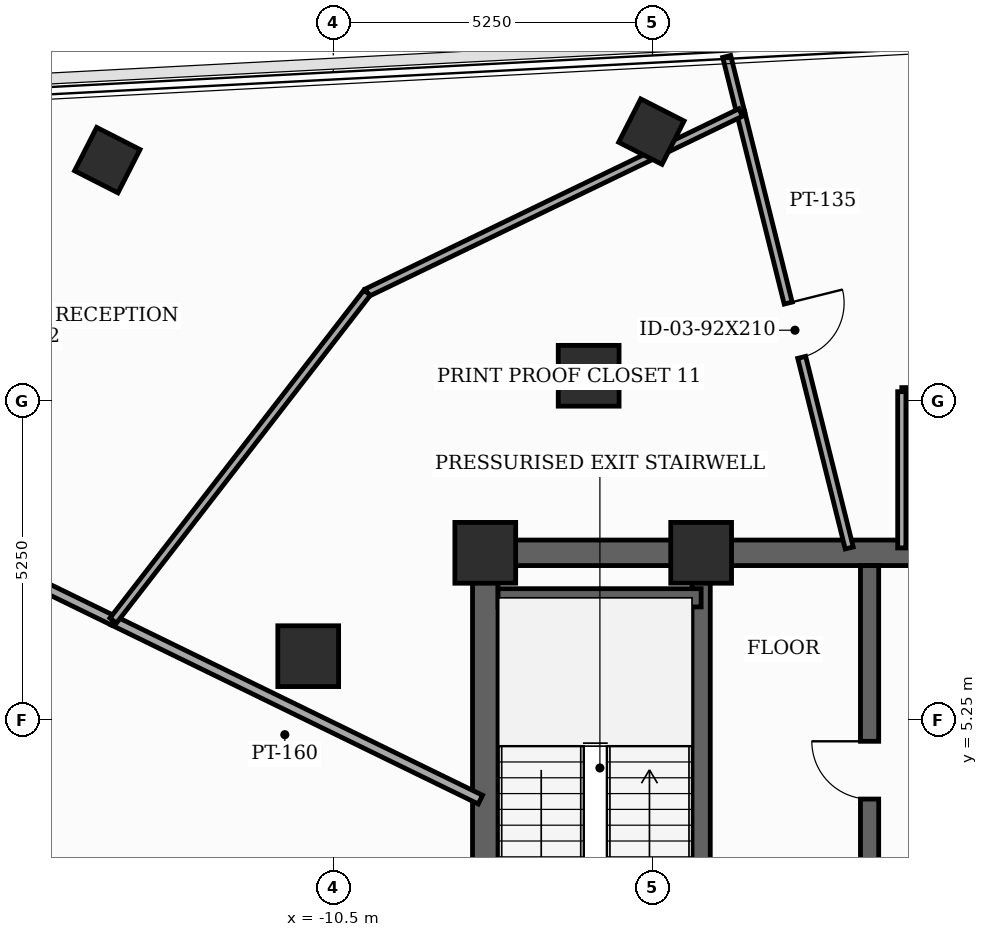
"""IFC4 building model, lengths in metres.
Left out: names, types, materials, properties, quantities, classifications, styles, units other than length and angle.
Written with IfcOpenShell. Run it as: python <this file> out.ifc"""

import sys

from ifc_helpers import new_model, si_unit, direction, frame, frame_2d, origin, origin_2d, place, context, subcontext, project, spatial, rectangle, extrude, element, fill, save


model = new_model("IFC4")
c1 = context("Model", 3, precision=1e-05, world=origin(), true_north=direction((0.0, 1.0)))
c2 = subcontext(c1, "Body", "Model", "MODEL_VIEW")
j1 = project(units=[si_unit("LENGTHUNIT", "METRE"), si_unit("PLANEANGLEUNIT", "RADIAN")], contexts=[c1])
p1 = place(None, origin())
s1 = spatial("IfcSite", under=j1, at=p1, CompositionType="ELEMENT")
p2 = place(p1, origin())
s2 = spatial("IfcBuilding", under=s1, at=p2, CompositionType="ELEMENT")
p3 = place(p2, frame((0.0, 0.0, 248.5)))
s3 = spatial("IfcBuildingStorey", under=s2, at=p3, CompositionType="ELEMENT", Elevation=248.5)
for number, where, z_axis, x_axis in (
    (1, (-4.45, 8.0, 0.0), (0.0, 0.0, 1.0), (1.0, 0.0, 0.0)),
    (2, (-8.0, 8.0, 0.0), (0.0, 0.0, 1.0), (1.0, 0.0, 0.0)),
    (3, (-6.3, 10.912, 0.0), (0.0, 0.0, 1.0), (1.0, 0.0, 0.0)),
    (4, (-10.912, 6.3, 0.0), (0.0, 0.0, 1.0), (1.0, 0.0, 0.0)),
):
    element("IfcColumn", number, at=place(p3, frame(where, z_axis=z_axis, x_axis=x_axis)), inside=s3, PredefinedType="COLUMN", context=c2, shape_type="SweptSolid", body=[
        extrude(rectangle(XDim=1.0, YDim=1.0, at=origin_2d()), origin(), (0.0, 0.0, 1.0), 3.7),
    ])
for number, where, z_axis, x_axis in (
    (5, (-5.269, 14.927, 0.0), (0.0, 0.0, 1.0), (0.454, 0.891, 0.0)),
    (6, (-14.216, 14.458, 0.0), (0.0, 0.0, 1.0), (0.454, 0.891, 0.0)),
):
    element("IfcColumn", number, at=place(p3, frame(where, z_axis=z_axis, x_axis=x_axis)), inside=s3, PredefinedType="COLUMN", context=c2, shape_type="SweptSolid", body=[
        extrude(rectangle(XDim=0.8, YDim=0.8, at=origin_2d()), origin(), (0.0, 0.0, 1.0), 3.7),
    ])
p4 = place(p3, frame((-8.0, -8.0, 0.0), z_axis=(0.0, 0.0, 1.0), x_axis=(0.0, 1.0, 0.0)))
e7 = element("IfcWall", 7, at=p4, inside=s3, PredefinedType="SHEAR", context=c2, shape_type="SweptSolid", body=[
    extrude(rectangle(XDim=16.0, YDim=0.42, at=frame_2d((8.0, 0.0))), origin(), (0.0, 0.0, 1.0), 3.5),
])
p5 = place(p4, frame((0.681, 0.0, 0.0)))
e8 = element("IfcOpeningElement", 8, at=p5, cuts=e7, PredefinedType="OPENING", context=c2, shape_type="SweptSolid", body=[
    extrude(rectangle(XDim=0.85, YDim=2.02, at=frame_2d((0.425, 1.01))), frame((0.0, 0.22, 0.0), z_axis=(0.0, -1.0, 0.0), x_axis=(1.0, 0.0, 0.0)), (0.0, 0.0, 1.0), 0.44),
])
p6 = place(p4, frame((5.35, 0.0, 0.0)))
e9 = element("IfcOpeningElement", 9, at=p6, cuts=e7, PredefinedType="OPENING", context=c2, shape_type="SweptSolid", body=[
    extrude(rectangle(XDim=1.05, YDim=2.15, at=frame_2d((0.525, 1.075))), frame((0.0, 0.22, 0.0), z_axis=(0.0, -1.0, 0.0), x_axis=(1.0, 0.0, 0.0)), (0.0, 0.0, 1.0), 0.44),
])
p7 = place(p3, frame((-8.0, 8.0, 0.0), z_axis=(0.0, 0.0, 1.0), x_axis=(1.0, 0.0, 0.0)))
e10 = element("IfcWall", 10, at=p7, inside=s3, PredefinedType="SHEAR", context=c2, shape_type="SweptSolid", body=[
    extrude(rectangle(XDim=16.0, YDim=0.42, at=frame_2d((8.0, 0.0))), origin(), (0.0, 0.0, 1.0), 3.5),
])
p8 = place(p7, frame((7.1, 0.0, 0.0)))
e11 = element("IfcOpeningElement", 11, at=p8, cuts=e10, PredefinedType="OPENING", context=c2, shape_type="SweptSolid", body=[
    extrude(rectangle(XDim=1.8, YDim=2.15, at=frame_2d((0.9, 1.075))), frame((0.0, 0.22, 0.0), z_axis=(0.0, -1.0, 0.0), x_axis=(1.0, 0.0, 0.0)), (0.0, 0.0, 1.0), 0.44),
])
p9 = place(p3, frame((-4.45, -7.79, 0.0), z_axis=(0.0, 0.0, 1.0), x_axis=(0.0, 1.0, 0.0)))
e12 = element("IfcWall", 12, at=p9, inside=s3, PredefinedType="SHEAR", context=c2, shape_type="SweptSolid", body=[
    extrude(rectangle(XDim=15.58, YDim=0.3, at=frame_2d((7.79, 0.0))), origin(), (0.0, 0.0, 1.0), 3.5),
])
p10 = place(p3, frame((-7.79, 7.26, 0.0), z_axis=(0.0, 0.0, 1.0), x_axis=(1.0, 0.0, 0.0)))
e13 = element("IfcWall", 13, at=p10, inside=s3, PredefinedType="SHEAR", context=c2, shape_type="SweptSolid", body=[
    extrude(rectangle(XDim=3.34, YDim=0.3, at=frame_2d((1.67, 0.0))), origin(), (0.0, 0.0, 1.0), 3.5),
])
p11 = place(p3, frame((-1.68, -4.85, 0.0), z_axis=(0.0, 0.0, 1.0), x_axis=(0.0, 1.0, 0.0)))
e14 = element("IfcWall", 14, at=p11, inside=s3, PredefinedType="SHEAR", context=c2, shape_type="SweptSolid", body=[
    extrude(rectangle(XDim=12.64, YDim=0.3, at=frame_2d((6.32, 0.0))), origin(), (0.0, 0.0, 1.0), 3.5),
])
p12 = place(p11, frame((2.6, 0.0, 0.0)))
e15 = element("IfcOpeningElement", 15, at=p12, cuts=e14, PredefinedType="OPENING", context=c2, shape_type="SweptSolid", body=[
    extrude(rectangle(XDim=0.95, YDim=2.1, at=frame_2d((0.475, 1.05))), frame((0.0, 0.16, 0.0), z_axis=(0.0, -1.0, 0.0), x_axis=(1.0, 0.0, 0.0)), (0.0, 0.0, 1.0), 0.32),
])
p13 = place(p11, frame((8.8, 0.0, 0.0)))
e16 = element("IfcOpeningElement", 16, at=p13, cuts=e14, PredefinedType="OPENING", context=c2, shape_type="SweptSolid", body=[
    extrude(rectangle(XDim=0.95, YDim=2.1, at=frame_2d((0.475, 1.05))), frame((0.0, 0.16, 0.0), z_axis=(0.0, -1.0, 0.0), x_axis=(1.0, 0.0, 0.0)), (0.0, 0.0, 1.0), 0.32),
])
p14 = place(p3, frame((4.742, 10.65, 0.0), z_axis=(0.0, 0.0, 1.0), x_axis=(-1.0, 0.0, 0.0)))
e17 = element("IfcWall", 17, at=p14, inside=s3, PredefinedType="PARTITIONING", context=c2, shape_type="SweptSolid", body=[
    extrude(rectangle(XDim=5.892, YDim=0.135, at=frame_2d((2.946, 0.0))), origin(), (0.0, 0.0, 1.0), 2.885),
])
p15 = place(p14, frame((2.471, 0.0, 0.0)))
e18 = element("IfcOpeningElement", 18, at=p15, cuts=e17, PredefinedType="OPENING", context=c2, shape_type="SweptSolid", body=[
    extrude(rectangle(XDim=0.95, YDim=2.1, at=frame_2d((0.475, 1.05))), frame((0.0, 0.077, 0.0), z_axis=(0.0, -1.0, 0.0), x_axis=(1.0, 0.0, 0.0)), (0.0, 0.0, 1.0), 0.155),
])
p16 = place(p3, frame((-1.15, 10.65, 0.0), z_axis=(0.0, 0.0, 1.0), x_axis=(0.0, -1.0, 0.0)))
e19 = element("IfcWall", 19, at=p16, inside=s3, PredefinedType="PARTITIONING", context=c2, shape_type="SweptSolid", body=[
    extrude(rectangle(XDim=2.57, YDim=0.135, at=frame_2d((1.285, 0.0))), origin(), (0.0, 0.0, 1.0), 2.885),
])
p17 = place(p3, frame((-8.08, 3.941, 0.0), z_axis=(0.0, 0.0, 1.0), x_axis=(-0.898794985177, 0.438369221798, 0.0)))
e20 = element("IfcWall", 20, at=p17, inside=s3, PredefinedType="PARTITIONING", context=c2, shape_type="SweptSolid", body=[
    extrude(rectangle(XDim=6.719, YDim=0.16, at=frame_2d((3.359, 0.0))), origin(), (0.0, 0.0, 1.0), 2.885),
])
p18 = place(p3, frame((-14.119, 6.886, 0.0), z_axis=(0.0, 0.0, 1.0), x_axis=(-0.898768620199, 0.438423274184, 0.0)))
e21 = element("IfcWall", 21, at=p18, inside=s3, PredefinedType="PARTITIONING", context=c2, shape_type="SweptSolid", body=[
    extrude(rectangle(XDim=13.442, YDim=0.16, at=frame_2d((6.721, 0.0))), origin(), (0.0, 0.0, 1.0), 3.035),
])
p19 = place(p18, frame((6.261, 0.0, 0.0)))
e22 = element("IfcOpeningElement", 22, at=p19, cuts=e21, PredefinedType="OPENING", context=c2, shape_type="SweptSolid", body=[
    extrude(rectangle(XDim=0.92, YDim=2.1, at=frame_2d((0.46, 1.05))), frame((0.0, 0.09, 0.0), z_axis=(0.0, -1.0, 0.0), x_axis=(1.0, 0.0, 0.0)), (0.0, 0.0, 1.0), 0.18),
])
p20 = place(p3, frame((-3.8, 15.242, 0.0), z_axis=(0.0, 0.0, 1.0), x_axis=(0.241889603588, -0.970303777008, 0.0)))
e23 = element("IfcWall", 23, at=p20, inside=s3, PredefinedType="PARTITIONING", context=c2, shape_type="SweptSolid", body=[
    extrude(rectangle(XDim=7.381, YDim=0.135, at=frame_2d((3.69, 0.0))), origin(), (0.0, 0.0, 1.0), 2.885),
])
p21 = place(p20, frame((3.231, 0.0, 0.0)))
e24 = element("IfcOpeningElement", 24, at=p21, cuts=e23, PredefinedType="OPENING", context=c2, shape_type="SweptSolid", body=[
    extrude(rectangle(XDim=0.92, YDim=2.1, at=frame_2d((0.46, 1.05))), frame((0.0, 0.077, 0.0), z_axis=(0.0, -1.0, 0.0), x_axis=(1.0, 0.0, 0.0)), (0.0, 0.0, 1.0), 0.155),
])
p22 = place(p3, frame((-4.03, 16.164, 0.0), z_axis=(0.0, 0.0, 1.0), x_axis=(0.241809991188, -0.970323620326, 0.0)))
e25 = element("IfcWall", 25, at=p22, inside=s3, PredefinedType="PARTITIONING", context=c2, shape_type="SweptSolid", body=[
    extrude(rectangle(XDim=0.95, YDim=0.135, at=frame_2d((0.475, 0.0))), origin(), (0.0, 0.0, 1.0), 3.5),
])
p23 = place(p3, frame((-3.8, 15.242, 0.0), z_axis=(0.0, 0.0, 1.0), x_axis=(-0.900708156853, -0.434424695635, 0.0)))
e26 = element("IfcWall", 26, at=p23, inside=s3, PredefinedType="PARTITIONING", context=c2, shape_type="SweptSolid", body=[
    extrude(rectangle(XDim=6.82, YDim=0.135, at=frame_2d((3.41, 0.0))), origin(), (0.0, 0.0, 1.0), 3.035),
])
p24 = place(p3, frame((-9.943, 12.279, 0.0), z_axis=(0.0, 0.0, 1.0), x_axis=(-0.612219395693, -0.790687935621, 0.0)))
e27 = element("IfcWall", 27, at=p24, inside=s3, PredefinedType="PARTITIONING", context=c2, shape_type="SweptSolid", body=[
    extrude(rectangle(XDim=6.821, YDim=0.135, at=frame_2d((3.41, 0.0))), origin(), (0.0, 0.0, 1.0), 3.185),
])
p25 = place(p13, origin())
e28 = element("IfcDoor", 28, at=p25, inside=s3, OperationType="SINGLE_SWING_RIGHT", PredefinedType="DOOR", context=c2, shape_type="SweptSolid", body=[
    extrude(rectangle(XDim=0.95, YDim=2.1, at=frame_2d((0.475, 1.05))), frame((0.0, 0.025, 0.0), z_axis=(0.0, -1.0, 0.0), x_axis=(1.0, 0.0, 0.0)), (0.0, 0.0, 1.0), 0.05),
])
fill(e16, e28)
p26 = place(p21, origin())
e29 = element("IfcDoor", 29, at=p26, inside=s3, OperationType="SINGLE_SWING_LEFT", PredefinedType="DOOR", context=c2, shape_type="SweptSolid", body=[
    extrude(rectangle(XDim=0.92, YDim=2.1, at=frame_2d((0.46, 1.05))), frame((0.0, 0.025, 0.0), z_axis=(0.0, -1.0, 0.0), x_axis=(1.0, 0.0, 0.0)), (0.0, 0.0, 1.0), 0.05),
])
fill(e24, e29)
save(model, sys.argv[1])
